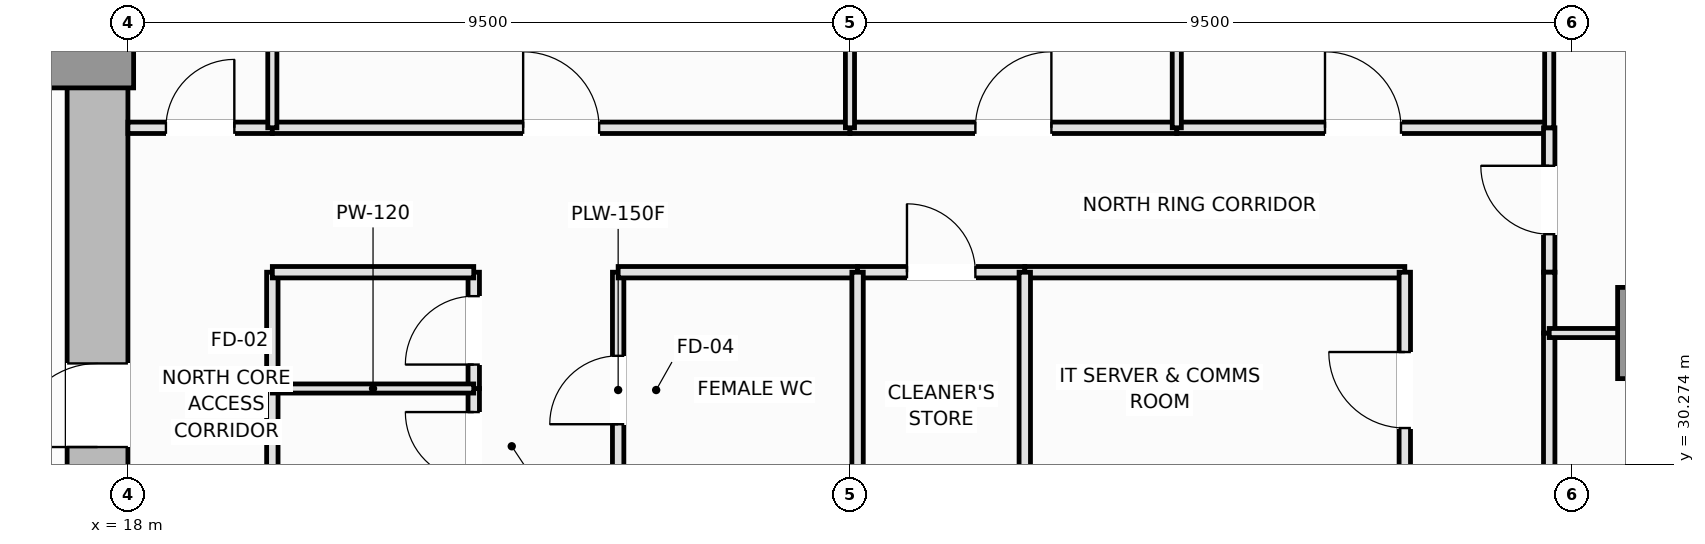
"""IFC4 building model, lengths in metres.
Left out: names, types, materials, properties, quantities, classifications, styles, units other than length and angle.
Written with IfcOpenShell. Run it as: python <this file> out.ifc"""

import sys

from ifc_helpers import new_model, si_unit, direction, frame, frame_2d, origin, origin_2d, place, context, subcontext, project, spatial, rectangle, extrude, element, fill, save


model = new_model("IFC4")
c1 = context("Model", 3, precision=1e-05, world=origin(), true_north=direction((0.0, 1.0)))
c2 = subcontext(c1, "Body", "Model", "MODEL_VIEW")
j1 = project(units=[si_unit("LENGTHUNIT", "METRE"), si_unit("PLANEANGLEUNIT", "RADIAN")], contexts=[c1])
p1 = place(None, origin())
s1 = spatial("IfcSite", under=j1, at=p1, CompositionType="ELEMENT")
p2 = place(p1, origin())
s2 = spatial("IfcBuilding", under=s1, at=p2, CompositionType="ELEMENT")
p3 = place(p2, frame((0.0, 0.0, 68.2)))
s3 = spatial("IfcBuildingStorey", under=s2, at=p3, CompositionType="ELEMENT", Elevation=68.2)
p4 = place(p3, frame((17.6, 27.05, 0.0), z_axis=(0.0, 0.0, 1.0), x_axis=(0.0, 1.0, 0.0)))
e1 = element("IfcWall", 1, at=p4, inside=s3, PredefinedType="SHEAR", context=c2, shape_type="SweptSolid", body=[
    extrude(rectangle(XDim=8.65, YDim=0.8, at=frame_2d((4.325, 0.0))), origin(), (0.0, 0.0, 1.0), 3.55),
])
p5 = place(p4, frame((3.45, 0.0, 0.0)))
e2 = element("IfcOpeningElement", 2, at=p5, cuts=e1, PredefinedType="OPENING", context=c2, shape_type="SweptSolid", body=[
    extrude(rectangle(XDim=1.1, YDim=2.15, at=frame_2d((0.55, 1.075))), frame((0.0, 0.41, 0.0), z_axis=(0.0, -1.0, 0.0), x_axis=(1.0, 0.0, 0.0)), (0.0, 0.0, 1.0), 0.82),
])
p6 = place(p3, frame((17.4, 35.9, 0.0), z_axis=(0.0, 0.0, 1.0), x_axis=(1.0, 0.0, 0.0)))
e3 = element("IfcColumn", 3, at=p6, inside=s3, PredefinedType="PILASTER", context=c2, shape_type="SweptSolid", body=[
    extrude(rectangle(XDim=1.35, YDim=1.35, at=origin_2d()), origin(), (0.0, 0.0, 1.0), 3.55),
])
p7 = place(p3, frame((38.2, 32.0, 0.0), z_axis=(0.0, 0.0, 1.0), x_axis=(1.0, 0.0, 0.0)))
e4 = element("IfcColumn", 4, at=p7, inside=s3, PredefinedType="COLUMN", context=c2, shape_type="SweptSolid", body=[
    extrude(rectangle(XDim=1.2, YDim=1.2, at=origin_2d()), origin(), (0.0, 0.0, 1.0), 3.55),
])
p8 = place(p3, frame((22.55, 29.75, 0.0), z_axis=(0.0, 0.0, 1.0), x_axis=(0.0, 1.0, 0.0)))
e5 = element("IfcWall", 5, at=p8, inside=s3, PredefinedType="PARTITIONING", context=c2, shape_type="SweptSolid", body=[
    extrude(rectangle(XDim=1.52, YDim=0.15, at=frame_2d((0.76, 0.0))), origin(), (0.0, 0.0, 1.0), 3.01),
])
p9 = place(p8, frame((0.31, 0.0, 0.0)))
e6 = element("IfcOpeningElement", 6, at=p9, cuts=e5, PredefinedType="OPENING", context=c2, shape_type="SweptSolid", body=[
    extrude(rectangle(XDim=0.9, YDim=2.1, at=frame_2d((0.45, 1.05))), frame((0.0, 0.085, 0.0), z_axis=(0.0, -1.0, 0.0), x_axis=(1.0, 0.0, 0.0)), (0.0, 0.0, 1.0), 0.17),
])
p10 = place(p3, frame((22.55, 31.27, 0.0), z_axis=(0.0, 0.0, 1.0), x_axis=(0.0, 1.0, 0.0)))
e7 = element("IfcWall", 7, at=p10, inside=s3, PredefinedType="PARTITIONING", context=c2, shape_type="SweptSolid", body=[
    extrude(rectangle(XDim=1.53, YDim=0.15, at=frame_2d((0.765, 0.0))), origin(), (0.0, 0.0, 1.0), 3.01),
])
p11 = place(p10, frame((0.315, 0.0, 0.0)))
e8 = element("IfcOpeningElement", 8, at=p11, cuts=e7, PredefinedType="OPENING", context=c2, shape_type="SweptSolid", body=[
    extrude(rectangle(XDim=0.9, YDim=2.1, at=frame_2d((0.45, 1.05))), frame((0.0, 0.085, 0.0), z_axis=(0.0, -1.0, 0.0), x_axis=(1.0, 0.0, 0.0)), (0.0, 0.0, 1.0), 0.17),
])
p12 = place(p3, frame((24.45, 29.7, 0.0), z_axis=(0.0, 0.0, 1.0), x_axis=(0.0, 1.0, 0.0)))
e9 = element("IfcWall", 9, at=p12, inside=s3, PredefinedType="PLUMBINGWALL", context=c2, shape_type="SweptSolid", body=[
    extrude(rectangle(XDim=3.1, YDim=0.15, at=frame_2d((1.55, 0.0))), origin(), (0.0, 0.0, 1.0), 3.37),
])
p13 = place(p12, frame((1.1, 0.0, 0.0)))
e10 = element("IfcOpeningElement", 10, at=p13, cuts=e9, PredefinedType="OPENING", context=c2, shape_type="SweptSolid", body=[
    extrude(rectangle(XDim=0.9, YDim=2.1, at=frame_2d((0.45, 1.05))), frame((0.0, 0.085, 0.0), z_axis=(0.0, -1.0, 0.0), x_axis=(1.0, 0.0, 0.0)), (0.0, 0.0, 1.0), 0.17),
])
p14 = place(p3, frame((19.9, 29.75, 0.0), z_axis=(0.0, 0.0, 1.0), x_axis=(0.0, 1.0, 0.0)))
e11 = element("IfcWall", 11, at=p14, inside=s3, PredefinedType="PARTITIONING", context=c2, shape_type="SweptSolid", body=[
    extrude(rectangle(XDim=1.52, YDim=0.15, at=frame_2d((0.76, 0.0))), origin(), (0.0, 0.0, 1.0), 3.37),
])
p15 = place(p3, frame((19.9, 31.27, 0.0), z_axis=(0.0, 0.0, 1.0), x_axis=(0.0, 1.0, 0.0)))
e12 = element("IfcWall", 12, at=p15, inside=s3, PredefinedType="PARTITIONING", context=c2, shape_type="SweptSolid", body=[
    extrude(rectangle(XDim=1.53, YDim=0.15, at=frame_2d((0.765, 0.0))), origin(), (0.0, 0.0, 1.0), 3.37),
])
p16 = place(p3, frame((19.9, 32.8, 0.0), z_axis=(0.0, 0.0, 1.0), x_axis=(1.0, 0.0, 0.0)))
e13 = element("IfcWall", 13, at=p16, inside=s3, PredefinedType="PARTITIONING", context=c2, shape_type="SweptSolid", body=[
    extrude(rectangle(XDim=2.65, YDim=0.15, at=frame_2d((1.325, 0.0))), origin(), (0.0, 0.0, 1.0), 3.37),
])
p17 = place(p3, frame((24.45, 32.8, 0.0), z_axis=(0.0, 0.0, 1.0), x_axis=(1.0, 0.0, 0.0)))
e14 = element("IfcWall", 14, at=p17, inside=s3, PredefinedType="PLUMBINGWALL", context=c2, shape_type="SweptSolid", body=[
    extrude(rectangle(XDim=3.15, YDim=0.15, at=frame_2d((1.575, 0.0))), origin(), (0.0, 0.0, 1.0), 3.37),
])
p18 = place(p3, frame((27.6, 32.8, 0.0), z_axis=(0.0, 0.0, 1.0), x_axis=(1.0, 0.0, 0.0)))
e15 = element("IfcWall", 15, at=p18, inside=s3, PredefinedType="PLUMBINGWALL", context=c2, shape_type="SweptSolid", body=[
    extrude(rectangle(XDim=2.2, YDim=0.15, at=frame_2d((1.1, 0.0))), origin(), (0.0, 0.0, 1.0), 3.37),
])
p19 = place(p18, frame((0.65, 0.0, 0.0)))
e16 = element("IfcOpeningElement", 16, at=p19, cuts=e15, PredefinedType="OPENING", context=c2, shape_type="SweptSolid", body=[
    extrude(rectangle(XDim=0.9, YDim=2.1, at=frame_2d((0.45, 1.05))), frame((0.0, 0.085, 0.0), z_axis=(0.0, -1.0, 0.0), x_axis=(1.0, 0.0, 0.0)), (0.0, 0.0, 1.0), 0.17),
])
p20 = place(p3, frame((29.8, 32.8, 0.0), z_axis=(0.0, 0.0, 1.0), x_axis=(1.0, 0.0, 0.0)))
e17 = element("IfcWall", 17, at=p20, inside=s3, PredefinedType="PARTITIONING", context=c2, shape_type="SweptSolid", body=[
    extrude(rectangle(XDim=5.0, YDim=0.15, at=frame_2d((2.5, 0.0))), origin(), (0.0, 0.0, 1.0), 3.37),
])
p21 = place(p3, frame((18.0, 34.7, 0.0), z_axis=(0.0, 0.0, 1.0), x_axis=(1.0, 0.0, 0.0)))
e18 = element("IfcWall", 18, at=p21, inside=s3, PredefinedType="PARTITIONING", context=c2, shape_type="SweptSolid", body=[
    extrude(rectangle(XDim=1.9, YDim=0.15, at=frame_2d((0.95, 0.0))), origin(), (0.0, 0.0, 1.0), 3.37),
])
p22 = place(p21, frame((0.5, 0.0, 0.0)))
e19 = element("IfcOpeningElement", 19, at=p22, cuts=e18, PredefinedType="OPENING", context=c2, shape_type="SweptSolid", body=[
    extrude(rectangle(XDim=0.9, YDim=2.1, at=frame_2d((0.45, 1.05))), frame((0.0, 0.085, 0.0), z_axis=(0.0, -1.0, 0.0), x_axis=(1.0, 0.0, 0.0)), (0.0, 0.0, 1.0), 0.17),
])
p23 = place(p3, frame((19.9, 34.7, 0.0), z_axis=(0.0, 0.0, 1.0), x_axis=(1.0, 0.0, 0.0)))
e20 = element("IfcWall", 20, at=p23, inside=s3, PredefinedType="PARTITIONING", context=c2, shape_type="SweptSolid", body=[
    extrude(rectangle(XDim=7.6, YDim=0.15, at=frame_2d((3.8, 0.0))), origin(), (0.0, 0.0, 1.0), 3.37),
])
p24 = place(p23, frame((3.3, 0.0, 0.0)))
e21 = element("IfcOpeningElement", 21, at=p24, cuts=e20, PredefinedType="OPENING", context=c2, shape_type="SweptSolid", body=[
    extrude(rectangle(XDim=1.0, YDim=2.15, at=frame_2d((0.5, 1.075))), frame((0.0, 0.085, 0.0), z_axis=(0.0, -1.0, 0.0), x_axis=(1.0, 0.0, 0.0)), (0.0, 0.0, 1.0), 0.17),
])
p25 = place(p3, frame((27.5, 34.7, 0.0), z_axis=(0.0, 0.0, 1.0), x_axis=(1.0, 0.0, 0.0)))
e22 = element("IfcWall", 22, at=p25, inside=s3, PredefinedType="PARTITIONING", context=c2, shape_type="SweptSolid", body=[
    extrude(rectangle(XDim=4.3, YDim=0.15, at=frame_2d((2.15, 0.0))), origin(), (0.0, 0.0, 1.0), 3.37),
])
p26 = place(p25, frame((1.65, 0.0, 0.0)))
e23 = element("IfcOpeningElement", 23, at=p26, cuts=e22, PredefinedType="OPENING", context=c2, shape_type="SweptSolid", body=[
    extrude(rectangle(XDim=1.0, YDim=2.15, at=frame_2d((0.5, 1.075))), frame((0.0, 0.085, 0.0), z_axis=(0.0, -1.0, 0.0), x_axis=(1.0, 0.0, 0.0)), (0.0, 0.0, 1.0), 0.17),
])
p27 = place(p3, frame((31.8, 34.7, 0.0), z_axis=(0.0, 0.0, 1.0), x_axis=(1.0, 0.0, 0.0)))
e24 = element("IfcWall", 24, at=p27, inside=s3, PredefinedType="PARTITIONING", context=c2, shape_type="SweptSolid", body=[
    extrude(rectangle(XDim=4.9, YDim=0.15, at=frame_2d((2.45, 0.0))), origin(), (0.0, 0.0, 1.0), 3.37),
])
p28 = place(p27, frame((1.95, 0.0, 0.0)))
e25 = element("IfcOpeningElement", 25, at=p28, cuts=e24, PredefinedType="OPENING", context=c2, shape_type="SweptSolid", body=[
    extrude(rectangle(XDim=1.0, YDim=2.15, at=frame_2d((0.5, 1.075))), frame((0.0, 0.085, 0.0), z_axis=(0.0, -1.0, 0.0), x_axis=(1.0, 0.0, 0.0)), (0.0, 0.0, 1.0), 0.17),
])
p29 = place(p3, frame((36.7, 32.8, 0.0), z_axis=(0.0, 0.0, 1.0), x_axis=(0.0, 1.0, 0.0)))
e26 = element("IfcWall", 26, at=p29, inside=s3, PredefinedType="PARTITIONING", context=c2, shape_type="SweptSolid", body=[
    extrude(rectangle(XDim=1.9, YDim=0.15, at=frame_2d((0.95, 0.0))), origin(), (0.0, 0.0, 1.0), 3.37),
])
p30 = place(p29, frame((0.5, 0.0, 0.0)))
e27 = element("IfcOpeningElement", 27, at=p30, cuts=e26, PredefinedType="OPENING", context=c2, shape_type="SweptSolid", body=[
    extrude(rectangle(XDim=0.9, YDim=2.1, at=frame_2d((0.45, 1.05))), frame((0.0, 0.085, 0.0), z_axis=(0.0, -1.0, 0.0), x_axis=(1.0, 0.0, 0.0)), (0.0, 0.0, 1.0), 0.17),
])
p31 = place(p3, frame((34.8, 29.7, 0.0), z_axis=(0.0, 0.0, 1.0), x_axis=(0.0, 1.0, 0.0)))
e28 = element("IfcWall", 28, at=p31, inside=s3, PredefinedType="PARTITIONING", context=c2, shape_type="SweptSolid", body=[
    extrude(rectangle(XDim=3.1, YDim=0.15, at=frame_2d((1.55, 0.0))), origin(), (0.0, 0.0, 1.0), 3.37),
])
p32 = place(p31, frame((1.05, 0.0, 0.0)))
e29 = element("IfcOpeningElement", 29, at=p32, cuts=e28, PredefinedType="OPENING", context=c2, shape_type="SweptSolid", body=[
    extrude(rectangle(XDim=1.0, YDim=2.15, at=frame_2d((0.5, 1.075))), frame((0.0, 0.085, 0.0), z_axis=(0.0, -1.0, 0.0), x_axis=(1.0, 0.0, 0.0)), (0.0, 0.0, 1.0), 0.17),
])
p33 = place(p3, frame((36.7, 17.7, 0.0), z_axis=(0.0, 0.0, 1.0), x_axis=(0.0, 1.0, 0.0)))
e30 = element("IfcWall", 30, at=p33, inside=s3, PredefinedType="PARTITIONING", context=c2, shape_type="SweptSolid", body=[
    extrude(rectangle(XDim=14.3, YDim=0.15, at=frame_2d((7.15, 0.0))), origin(), (0.0, 0.0, 1.0), 3.37),
])
p34 = place(p33, frame((5.683, 0.0, 0.0)))
e31 = element("IfcOpeningElement", 31, at=p34, cuts=e30, PredefinedType="OPENING", context=c2, shape_type="SweptSolid", body=[
    extrude(rectangle(XDim=1.0, YDim=2.15, at=frame_2d((0.5, 1.075))), frame((0.0, 0.085, 0.0), z_axis=(0.0, -1.0, 0.0), x_axis=(1.0, 0.0, 0.0)), (0.0, 0.0, 1.0), 0.17),
])
p35 = place(p3, frame((36.7, 32.0, 0.0), z_axis=(0.0, 0.0, 1.0), x_axis=(0.0, 1.0, 0.0)))
e32 = element("IfcWall", 32, at=p35, inside=s3, PredefinedType="PARTITIONING", context=c2, shape_type="SweptSolid", body=[
    extrude(rectangle(XDim=0.8, YDim=0.15, at=frame_2d((0.4, 0.0))), origin(), (0.0, 0.0, 1.0), 3.37),
])
p36 = place(p3, frame((19.9, 31.27, 0.0), z_axis=(0.0, 0.0, 1.0), x_axis=(1.0, 0.0, 0.0)))
e33 = element("IfcWall", 33, at=p36, inside=s3, PredefinedType="PARTITIONING", context=c2, shape_type="SweptSolid", body=[
    extrude(rectangle(XDim=2.65, YDim=0.12, at=frame_2d((1.325, 0.0))), origin(), (0.0, 0.0, 1.0), 3.37),
])
for number, where, z_axis, x_axis in (
    (34, (27.6, 29.7, 0.0), (0.0, 0.0, 1.0), (0.0, 1.0, 0.0)),
    (35, (29.8, 29.7, 0.0), (0.0, 0.0, 1.0), (0.0, 1.0, 0.0)),
):
    element("IfcWall", number, at=place(p3, frame(where, z_axis=z_axis, x_axis=x_axis)), inside=s3, PredefinedType="PLUMBINGWALL", context=c2, shape_type="SweptSolid", body=[
        extrude(rectangle(XDim=3.1, YDim=0.15, at=frame_2d((1.55, 0.0))), origin(), (0.0, 0.0, 1.0), 3.37),
    ])
p37 = place(p3, frame((19.9, 34.7, 0.0), z_axis=(0.0, 0.0, 1.0), x_axis=(0.0, 1.0, 0.0)))
e36 = element("IfcWall", 36, at=p37, inside=s3, PredefinedType="PARTITIONING", context=c2, shape_type="SweptSolid", body=[
    extrude(rectangle(XDim=13.29, YDim=0.12, at=frame_2d((6.645, 0.0))), origin(), (0.0, 0.0, 1.0), 3.37),
])
p38 = place(p3, frame((27.5, 34.7, 0.0), z_axis=(0.0, 0.0, 1.0), x_axis=(0.0, 1.0, 0.0)))
e37 = element("IfcWall", 37, at=p38, inside=s3, PredefinedType="PARTITIONING", context=c2, shape_type="SweptSolid", body=[
    extrude(rectangle(XDim=13.29, YDim=0.12, at=frame_2d((6.645, 0.0))), origin(), (0.0, 0.0, 1.0), 2.82),
])
for number, where, z_axis, x_axis in (
    (38, (31.8, 34.7, 0.0), (0.0, 0.0, 1.0), (0.0, 1.0, 0.0)),
    (39, (36.7, 34.7, 0.0), (0.0, 0.0, 1.0), (0.0, 1.0, 0.0)),
):
    element("IfcWall", number, at=place(p3, frame(where, z_axis=z_axis, x_axis=x_axis)), inside=s3, PredefinedType="PARTITIONING", context=c2, shape_type="SweptSolid", body=[
        extrude(rectangle(XDim=13.29, YDim=0.12, at=frame_2d((6.645, 0.0))), origin(), (0.0, 0.0, 1.0), 3.37),
    ])
p39 = place(p3, frame((36.7, 32.0, 0.0), z_axis=(0.0, 0.0, 1.0), x_axis=(1.0, 0.0, 0.0)))
e40 = element("IfcWall", 40, at=p39, inside=s3, PredefinedType="PARTITIONING", context=c2, shape_type="SweptSolid", body=[
    extrude(rectangle(XDim=16.79, YDim=0.12, at=frame_2d((8.395, 0.0))), origin(), (0.0, 0.0, 1.0), 2.72),
])
p40 = place(p5, origin())
e41 = element("IfcDoor", 41, at=p40, inside=s3, OperationType="SINGLE_SWING_LEFT", PredefinedType="DOOR", context=c2, shape_type="SweptSolid", body=[
    extrude(rectangle(XDim=1.1, YDim=2.15, at=frame_2d((0.55, 1.075))), frame((0.0, 0.025, 0.0), z_axis=(0.0, -1.0, 0.0), x_axis=(1.0, 0.0, 0.0)), (0.0, 0.0, 1.0), 0.05),
])
fill(e2, e41)
p41 = place(p9, origin())
e42 = element("IfcDoor", 42, at=p41, inside=s3, OperationType="SINGLE_SWING_RIGHT", PredefinedType="DOOR", context=c2, shape_type="SweptSolid", body=[
    extrude(rectangle(XDim=0.9, YDim=2.1, at=frame_2d((0.45, 1.05))), frame((0.0, 0.025, 0.0), z_axis=(0.0, -1.0, 0.0), x_axis=(1.0, 0.0, 0.0)), (0.0, 0.0, 1.0), 0.05),
])
fill(e6, e42)
p42 = place(p11, origin())
e43 = element("IfcDoor", 43, at=p42, inside=s3, OperationType="SINGLE_SWING_LEFT", PredefinedType="DOOR", context=c2, shape_type="SweptSolid", body=[
    extrude(rectangle(XDim=0.9, YDim=2.1, at=frame_2d((0.45, 1.05))), frame((0.0, 0.025, 0.0), z_axis=(0.0, -1.0, 0.0), x_axis=(1.0, 0.0, 0.0)), (0.0, 0.0, 1.0), 0.05),
])
fill(e8, e43)
p43 = place(p13, origin())
e44 = element("IfcDoor", 44, at=p43, inside=s3, OperationType="SINGLE_SWING_LEFT", PredefinedType="DOOR", context=c2, shape_type="SweptSolid", body=[
    extrude(rectangle(XDim=0.9, YDim=2.1, at=frame_2d((0.45, 1.05))), frame((0.0, 0.025, 0.0), z_axis=(0.0, -1.0, 0.0), x_axis=(1.0, 0.0, 0.0)), (0.0, 0.0, 1.0), 0.05),
])
fill(e10, e44)
p44 = place(p19, origin())
e45 = element("IfcDoor", 45, at=p44, inside=s3, OperationType="SINGLE_SWING_LEFT", PredefinedType="DOOR", context=c2, shape_type="SweptSolid", body=[
    extrude(rectangle(XDim=0.9, YDim=2.1, at=frame_2d((0.45, 1.05))), frame((0.0, 0.025, 0.0), z_axis=(0.0, -1.0, 0.0), x_axis=(1.0, 0.0, 0.0)), (0.0, 0.0, 1.0), 0.05),
])
fill(e16, e45)
p45 = place(p22, origin())
e46 = element("IfcDoor", 46, at=p45, inside=s3, OperationType="SINGLE_SWING_RIGHT", PredefinedType="DOOR", context=c2, shape_type="SweptSolid", body=[
    extrude(rectangle(XDim=0.9, YDim=2.1, at=frame_2d((0.45, 1.05))), frame((0.0, 0.025, 0.0), z_axis=(0.0, -1.0, 0.0), x_axis=(1.0, 0.0, 0.0)), (0.0, 0.0, 1.0), 0.05),
])
fill(e19, e46)
p46 = place(p24, origin())
e47 = element("IfcDoor", 47, at=p46, inside=s3, OperationType="SINGLE_SWING_LEFT", PredefinedType="DOOR", context=c2, shape_type="SweptSolid", body=[
    extrude(rectangle(XDim=1.0, YDim=2.15, at=frame_2d((0.5, 1.075))), frame((0.0, 0.025, 0.0), z_axis=(0.0, -1.0, 0.0), x_axis=(1.0, 0.0, 0.0)), (0.0, 0.0, 1.0), 0.05),
])
fill(e21, e47)
p47 = place(p26, origin())
e48 = element("IfcDoor", 48, at=p47, inside=s3, OperationType="SINGLE_SWING_RIGHT", PredefinedType="DOOR", context=c2, shape_type="SweptSolid", body=[
    extrude(rectangle(XDim=1.0, YDim=2.15, at=frame_2d((0.5, 1.075))), frame((0.0, 0.025, 0.0), z_axis=(0.0, -1.0, 0.0), x_axis=(1.0, 0.0, 0.0)), (0.0, 0.0, 1.0), 0.05),
])
fill(e23, e48)
p48 = place(p28, origin())
e49 = element("IfcDoor", 49, at=p48, inside=s3, OperationType="SINGLE_SWING_LEFT", PredefinedType="DOOR", context=c2, shape_type="SweptSolid", body=[
    extrude(rectangle(XDim=1.0, YDim=2.15, at=frame_2d((0.5, 1.075))), frame((0.0, 0.025, 0.0), z_axis=(0.0, -1.0, 0.0), x_axis=(1.0, 0.0, 0.0)), (0.0, 0.0, 1.0), 0.05),
])
fill(e25, e49)
p49 = place(p30, origin())
e50 = element("IfcDoor", 50, at=p49, inside=s3, OperationType="SINGLE_SWING_RIGHT", PredefinedType="DOOR", context=c2, shape_type="SweptSolid", body=[
    extrude(rectangle(XDim=0.9, YDim=2.1, at=frame_2d((0.45, 1.05))), frame((0.0, 0.025, 0.0), z_axis=(0.0, -1.0, 0.0), x_axis=(1.0, 0.0, 0.0)), (0.0, 0.0, 1.0), 0.05),
])
fill(e27, e50)
p50 = place(p32, origin())
e51 = element("IfcDoor", 51, at=p50, inside=s3, OperationType="SINGLE_SWING_RIGHT", PredefinedType="DOOR", context=c2, shape_type="SweptSolid", body=[
    extrude(rectangle(XDim=1.0, YDim=2.15, at=frame_2d((0.5, 1.075))), frame((0.0, 0.025, 0.0), z_axis=(0.0, -1.0, 0.0), x_axis=(1.0, 0.0, 0.0)), (0.0, 0.0, 1.0), 0.05),
])
fill(e29, e51)
save(model, sys.argv[1])
